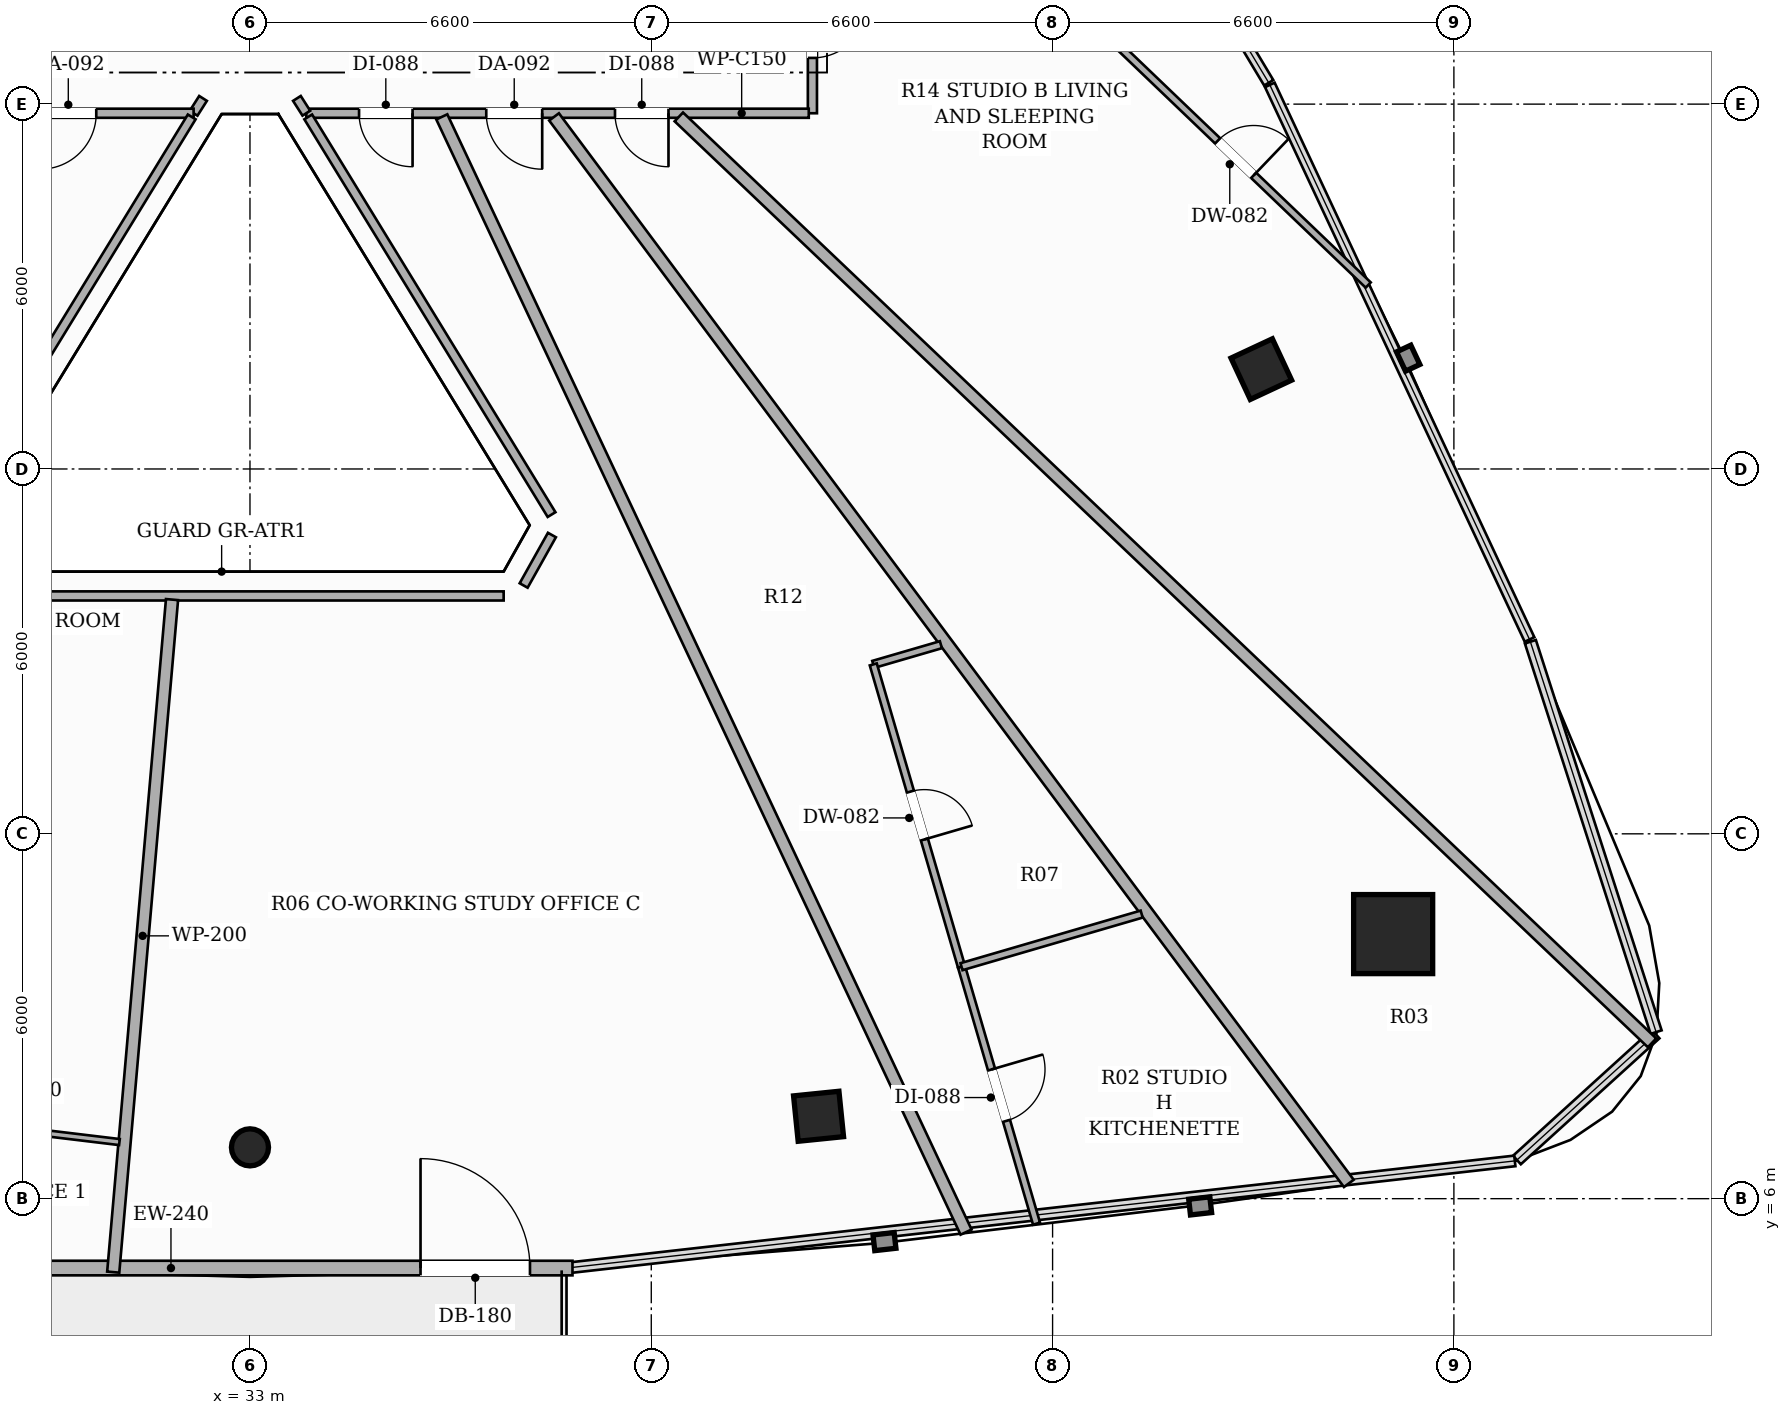
"""IFC4 building model, lengths in metres.
Left out: names, types, materials, properties, quantities, classifications, styles, units other than length and angle.
Written with IfcOpenShell. Run it as: python <this file> out.ifc"""

import sys

from ifc_helpers import new_model, si_unit, direction, frame, frame_2d, origin, origin_2d, place, context, subcontext, project, spatial, rectangle, hollow_rectangle, hollow_circle, extrude, element, fill, save


model = new_model("IFC4")
c1 = context("Model", 3, precision=1e-05, world=origin(), true_north=direction((0.0, 1.0)))
c2 = subcontext(c1, "Body", "Model", "MODEL_VIEW")
j1 = project(units=[si_unit("LENGTHUNIT", "METRE"), si_unit("PLANEANGLEUNIT", "RADIAN")], contexts=[c1])
p1 = place(None, origin())
s1 = spatial("IfcSite", under=j1, at=p1, CompositionType="ELEMENT")
p2 = place(p1, origin())
s2 = spatial("IfcBuilding", under=s1, at=p2, CompositionType="ELEMENT")
p3 = place(p2, frame((0.0, 0.0, 216.2)))
s3 = spatial("IfcBuildingStorey", under=s2, at=p3, CompositionType="ELEMENT", Elevation=216.2)
p4 = place(p3, frame((51.801, 10.351, 0.0), z_axis=(0.0, 0.0, 1.0), x_axis=(1.0, 0.0, 0.0)))
e1 = element("IfcColumn", 1, at=p4, inside=s3, PredefinedType="COLUMN", context=c2, shape_type="SweptSolid", body=[
    extrude(hollow_rectangle(XDim=1.3, YDim=1.3, WallThickness=0.04, at=origin_2d()), origin(), (0.0, 0.0, 1.0), 3.3),
])
p5 = place(p3, frame((33.0, 6.844, 0.0), z_axis=(0.0, 0.0, 1.0), x_axis=(1.0, 0.0, 0.0)))
e2 = element("IfcColumn", 2, at=p5, inside=s3, PredefinedType="COLUMN", context=c2, shape_type="SweptSolid", body=[
    extrude(hollow_circle(Radius=0.305, WallThickness=0.016, at=origin_2d()), origin(), (0.0, 0.0, 1.0), 3.3),
])
for number, where, z_axis, x_axis in (
    (3, (42.351, 7.355, 0.0), (0.0, 0.0, 1.0), (0.995, 0.101, 0.0)),
    (4, (49.633, 19.642, 0.0), (0.0, 0.0, 1.0), (-0.423, 0.906, 0.0)),
):
    element("IfcColumn", number, at=place(p3, frame(where, z_axis=z_axis, x_axis=x_axis)), inside=s3, PredefinedType="COLUMN", context=c2, shape_type="SweptSolid", body=[
        extrude(hollow_rectangle(XDim=0.75, YDim=0.75, WallThickness=0.025, at=origin_2d()), origin(), (0.0, 0.0, 1.0), 3.3),
    ])
p6 = place(p3, frame((27.696, 4.859, 0.0), z_axis=(0.0, 0.0, 1.0), x_axis=(1.0, 0.0, 0.0)))
e5 = element("IfcWall", 5, at=p6, inside=s3, PredefinedType="SOLIDWALL", context=c2, shape_type="SweptSolid", body=[
    extrude(rectangle(XDim=10.608, YDim=0.24, at=frame_2d((5.304, 0.0))), origin(), (0.0, 0.0, 1.0), 2.624),
])
p7 = place(p6, frame((8.109, 0.0, 0.0)))
e6 = element("IfcOpeningElement", 6, at=p7, cuts=e5, PredefinedType="OPENING", context=c2, shape_type="SweptSolid", body=[
    extrude(rectangle(XDim=1.8, YDim=2.2, at=frame_2d((0.9, 1.1))), frame((0.0, 0.13, 0.0), z_axis=(0.0, -1.0, 0.0), x_axis=(1.0, 0.0, 0.0)), (0.0, 0.0, 1.0), 0.26),
])
p8 = place(p3, frame((32.228, 24.094, 0.0), z_axis=(0.0, 0.0, 1.0), x_axis=(-0.53643811989, -0.843939656331, 0.0)))
e7 = element("IfcWall", 7, at=p8, inside=s3, PredefinedType="PARTITIONING", context=c2, shape_type="SweptSolid", body=[
    extrude(rectangle(XDim=0.289, YDim=0.15, at=frame_2d((0.145, 0.0))), origin(), (0.0, 0.0, 1.0), 3.06),
])
p9 = place(p3, frame((32.073, 23.85, 0.0), z_axis=(0.0, 0.0, 1.0), x_axis=(-1.0, 0.0, 0.0)))
e8 = element("IfcWall", 8, at=p9, inside=s3, PredefinedType="PARTITIONING", context=c2, shape_type="SweptSolid", body=[
    extrude(rectangle(XDim=8.423, YDim=0.15, at=frame_2d((4.211, 0.0))), origin(), (0.0, 0.0, 1.0), 2.565),
])
p10 = place(p9, frame((1.601, 0.0, 0.0)))
e9 = element("IfcOpeningElement", 9, at=p10, cuts=e8, PredefinedType="OPENING", context=c2, shape_type="SweptSolid", body=[
    extrude(rectangle(XDim=0.92, YDim=2.15, at=frame_2d((0.46, 1.075))), frame((0.0, 0.085, 0.0), z_axis=(0.0, -1.0, 0.0), x_axis=(1.0, 0.0, 0.0)), (0.0, 0.0, 1.0), 0.17),
])
p11 = place(p9, frame((4.841, 0.0, 0.0)))
e10 = element("IfcOpeningElement", 10, at=p11, cuts=e8, PredefinedType="OPENING", context=c2, shape_type="SweptSolid", body=[
    extrude(rectangle(XDim=0.88, YDim=2.1, at=frame_2d((0.44, 1.05))), frame((0.0, 0.085, 0.0), z_axis=(0.0, -1.0, 0.0), x_axis=(1.0, 0.0, 0.0)), (0.0, 0.0, 1.0), 0.17),
])
p12 = place(p3, frame((42.25, 26.59, 0.0), z_axis=(0.0, 0.0, 1.0), x_axis=(0.0, -1.0, 0.0)))
e11 = element("IfcWall", 11, at=p12, inside=s3, PredefinedType="PARTITIONING", context=c2, shape_type="SweptSolid", body=[
    extrude(rectangle(XDim=2.74, YDim=0.15, at=frame_2d((1.37, 0.0))), origin(), (0.0, 0.0, 1.0), 2.773),
])
p13 = place(p12, frame((0.91, 0.0, 0.0)))
e12 = element("IfcOpeningElement", 12, at=p13, cuts=e11, PredefinedType="OPENING", context=c2, shape_type="SweptSolid", body=[
    extrude(rectangle(XDim=0.92, YDim=2.15, at=frame_2d((0.46, 1.075))), frame((0.0, 0.085, 0.0), z_axis=(0.0, -1.0, 0.0), x_axis=(1.0, 0.0, 0.0)), (0.0, 0.0, 1.0), 0.17),
])
p14 = place(p3, frame((42.19, 23.85, 0.0), z_axis=(0.0, 0.0, 1.0), x_axis=(-1.0, 0.0, 0.0)))
e13 = element("IfcWall", 13, at=p14, inside=s3, PredefinedType="PARTITIONING", context=c2, shape_type="SweptSolid", body=[
    extrude(rectangle(XDim=8.263, YDim=0.15, at=frame_2d((4.131, 0.0))), origin(), (0.0, 0.0, 1.0), 2.565),
])
p15 = place(p14, frame((6.516, 0.0, 0.0)))
e14 = element("IfcOpeningElement", 14, at=p15, cuts=e13, PredefinedType="OPENING", context=c2, shape_type="SweptSolid", body=[
    extrude(rectangle(XDim=0.88, YDim=2.1, at=frame_2d((0.44, 1.05))), frame((0.0, 0.085, 0.0), z_axis=(0.0, -1.0, 0.0), x_axis=(1.0, 0.0, 0.0)), (0.0, 0.0, 1.0), 0.17),
])
p16 = place(p14, frame((2.307, 0.0, 0.0)))
e15 = element("IfcOpeningElement", 15, at=p16, cuts=e13, PredefinedType="OPENING", context=c2, shape_type="SweptSolid", body=[
    extrude(rectangle(XDim=0.88, YDim=2.1, at=frame_2d((0.44, 1.05))), frame((0.0, 0.085, 0.0), z_axis=(0.0, -1.0, 0.0), x_axis=(1.0, 0.0, 0.0)), (0.0, 0.0, 1.0), 0.17),
])
p17 = place(p14, frame((4.384, 0.0, 0.0)))
e16 = element("IfcOpeningElement", 16, at=p17, cuts=e13, PredefinedType="OPENING", context=c2, shape_type="SweptSolid", body=[
    extrude(rectangle(XDim=0.92, YDim=2.15, at=frame_2d((0.46, 1.075))), frame((0.0, 0.085, 0.0), z_axis=(0.0, -1.0, 0.0), x_axis=(1.0, 0.0, 0.0)), (0.0, 0.0, 1.0), 0.17),
])
p18 = place(p3, frame((33.927, 23.851, 0.0), z_axis=(0.0, 0.0, 1.0), x_axis=(-0.537971414128, 0.84296308198, 0.0)))
e17 = element("IfcWall", 17, at=p18, inside=s3, PredefinedType="PARTITIONING", context=c2, shape_type="SweptSolid", body=[
    extrude(rectangle(XDim=0.288, YDim=0.15, at=frame_2d((0.144, 0.0))), origin(), (0.0, 0.0, 1.0), 3.06),
])
p19 = place(p3, frame((33.958, 23.79, 0.0), z_axis=(0.0, 0.0, 1.0), x_axis=(0.521949656317, -0.852976292912, 0.0)))
e18 = element("IfcWall", 18, at=p19, inside=s3, PredefinedType="PARTITIONING", context=c2, shape_type="SweptSolid", body=[
    extrude(rectangle(XDim=7.667, YDim=0.15, at=frame_2d((3.833, 0.0))), origin(), (0.0, 0.0, 1.0), 2.773),
])
p20 = place(p3, frame((37.966, 16.914, 0.0), z_axis=(0.0, 0.0, 1.0), x_axis=(-0.48879868802, -0.872396608539, 0.0)))
e19 = element("IfcWall", 19, at=p20, inside=s3, PredefinedType="PARTITIONING", context=c2, shape_type="SweptSolid", body=[
    extrude(rectangle(XDim=0.951, YDim=0.15, at=frame_2d((0.476, 0.0))), origin(), (0.0, 0.0, 1.0), 3.06),
])
p21 = place(p3, frame((37.172, 15.912, 0.0), z_axis=(0.0, 0.0, 1.0), x_axis=(-1.0, 0.0, 0.0)))
e20 = element("IfcWall", 20, at=p21, inside=s3, PredefinedType="PARTITIONING", context=c2, shape_type="SweptSolid", body=[
    extrude(rectangle(XDim=8.344, YDim=0.15, at=frame_2d((4.172, 0.0))), origin(), (0.0, 0.0, 1.0), 2.773),
])
p22 = place(p3, frame((28.04, 17.25, 0.0), z_axis=(0.0, 0.0, 1.0), x_axis=(0.521949656317, 0.852976292912, 0.0)))
e21 = element("IfcWall", 21, at=p22, inside=s3, PredefinedType="PARTITIONING", context=c2, shape_type="SweptSolid", body=[
    extrude(rectangle(XDim=7.667, YDim=0.15, at=frame_2d((3.833, 0.0))), origin(), (0.0, 0.0, 1.0), 2.773),
])
p23 = place(p3, frame((31.718, 15.852, 0.0), z_axis=(0.0, 0.0, 1.0), x_axis=(-0.087103117533, -0.996199300801, 0.0)))
e22 = element("IfcWall", 22, at=p23, inside=s3, PredefinedType="PARTITIONING", context=c2, shape_type="SweptSolid", body=[
    extrude(rectangle(XDim=11.102, YDim=0.2, at=frame_2d((5.551, 0.0))), origin(), (0.0, 0.0, 1.0), 2.492),
])
p24 = place(p3, frame((56.059, 8.563, 0.0), z_axis=(0.0, 0.0, 1.0), x_axis=(-0.724518891706, 0.689254942355, 0.0)))
e23 = element("IfcWall", 23, at=p24, inside=s3, PredefinedType="PARTITIONING", context=c2, shape_type="SweptSolid", body=[
    extrude(rectangle(XDim=22.092, YDim=0.2, at=frame_2d((11.046, 0.0))), origin(), (0.0, 0.0, 1.0), 2.492),
])
p25 = place(p3, frame((36.155, 23.79, 0.0), z_axis=(0.0, 0.0, 1.0), x_axis=(0.425451226132, -0.90498135571, 0.0)))
e24 = element("IfcWall", 24, at=p25, inside=s3, PredefinedType="PARTITIONING", context=c2, shape_type="SweptSolid", body=[
    extrude(rectangle(XDim=20.266, YDim=0.2, at=frame_2d((10.133, 0.0))), origin(), (0.0, 0.0, 1.0), 2.492),
])
p26 = place(p3, frame((51.072, 6.251, 0.0), z_axis=(0.0, 0.0, 1.0), x_axis=(-0.59756139073, 0.801823162742, 0.0)))
e25 = element("IfcWall", 25, at=p26, inside=s3, PredefinedType="PARTITIONING", context=c2, shape_type="SweptSolid", body=[
    extrude(rectangle(XDim=21.874, YDim=0.2, at=frame_2d((10.937, 0.0))), origin(), (0.0, 0.0, 1.0), 2.492),
])
p27 = place(p3, frame((30.853, 6.931, 0.0), z_axis=(0.0, 0.0, 1.0), x_axis=(-0.992840033501, 0.119451529409, 0.0)))
e26 = element("IfcWall", 26, at=p27, inside=s3, PredefinedType="PARTITIONING", context=c2, shape_type="SweptSolid", body=[
    extrude(rectangle(XDim=7.417, YDim=0.1, at=frame_2d((3.708, 0.0))), origin(), (0.0, 0.0, 1.0), 2.492),
])
p28 = place(p27, frame((3.269, 0.0, 0.0)))
e27 = element("IfcOpeningElement", 27, at=p28, cuts=e26, PredefinedType="OPENING", context=c2, shape_type="SweptSolid", body=[
    extrude(rectangle(XDim=0.88, YDim=2.1, at=frame_2d((0.44, 1.05))), frame((0.0, 0.06, 0.0), z_axis=(0.0, -1.0, 0.0), x_axis=(1.0, 0.0, 0.0)), (0.0, 0.0, 1.0), 0.12),
])
p29 = place(p3, frame((47.03, 25.2, 0.0), z_axis=(0.0, 0.0, 1.0), x_axis=(0.722345830301, -0.691531995968, 0.0)))
e28 = element("IfcWall", 28, at=p29, inside=s3, PredefinedType="PARTITIONING", context=c2, shape_type="SweptSolid", body=[
    extrude(rectangle(XDim=6.037, YDim=0.12, at=frame_2d((3.019, 0.0))), origin(), (0.0, 0.0, 1.0), 2.492),
])
p30 = place(p29, frame((2.609, 0.0, 0.0)))
e29 = element("IfcOpeningElement", 29, at=p30, cuts=e28, PredefinedType="OPENING", context=c2, shape_type="SweptSolid", body=[
    extrude(rectangle(XDim=0.82, YDim=2.1, at=frame_2d((0.41, 1.05))), frame((0.0, 0.07, 0.0), z_axis=(0.0, -1.0, 0.0), x_axis=(1.0, 0.0, 0.0)), (0.0, 0.0, 1.0), 0.14),
])
p31 = place(p3, frame((44.363, 15.11, 0.0), z_axis=(0.0, 0.0, 1.0), x_axis=(-0.960030681494, -0.279894784857, 0.0)))
e30 = element("IfcWall", 30, at=p31, inside=s3, PredefinedType="PARTITIONING", context=c2, shape_type="SweptSolid", body=[
    extrude(rectangle(XDim=1.158, YDim=0.12, at=frame_2d((0.579, 0.0))), origin(), (0.0, 0.0, 1.0), 2.773),
])
p32 = place(p3, frame((43.251, 14.786, 0.0), z_axis=(0.0, 0.0, 1.0), x_axis=(0.280190088139, -0.959944537204, 0.0)))
e31 = element("IfcWall", 31, at=p32, inside=s3, PredefinedType="PARTITIONING", context=c2, shape_type="SweptSolid", body=[
    extrude(rectangle(XDim=5.178, YDim=0.12, at=frame_2d((2.589, 0.0))), origin(), (0.0, 0.0, 1.0), 3.06),
])
p33 = place(p32, frame((2.179, 0.0, 0.0)))
e32 = element("IfcOpeningElement", 32, at=p33, cuts=e31, PredefinedType="OPENING", context=c2, shape_type="SweptSolid", body=[
    extrude(rectangle(XDim=0.82, YDim=2.1, at=frame_2d((0.41, 1.05))), frame((0.0, 0.07, 0.0), z_axis=(0.0, -1.0, 0.0), x_axis=(1.0, 0.0, 0.0)), (0.0, 0.0, 1.0), 0.14),
])
p34 = place(p3, frame((44.702, 9.815, 0.0), z_axis=(0.0, 0.0, 1.0), x_axis=(0.28033432121, -0.959902426474, 0.0)))
e33 = element("IfcWall", 33, at=p34, inside=s3, PredefinedType="PARTITIONING", context=c2, shape_type="SweptSolid", body=[
    extrude(rectangle(XDim=4.402, YDim=0.12, at=frame_2d((2.201, 0.0))), origin(), (0.0, 0.0, 1.0), 2.492),
])
p35 = place(p34, frame((1.761, 0.0, 0.0)))
e34 = element("IfcOpeningElement", 34, at=p35, cuts=e33, PredefinedType="OPENING", context=c2, shape_type="SweptSolid", body=[
    extrude(rectangle(XDim=0.88, YDim=2.1, at=frame_2d((0.44, 1.05))), frame((0.0, 0.07, 0.0), z_axis=(0.0, -1.0, 0.0), x_axis=(1.0, 0.0, 0.0)), (0.0, 0.0, 1.0), 0.14),
])
p36 = place(p3, frame((47.665, 10.68, 0.0), z_axis=(0.0, 0.0, 1.0), x_axis=(-0.959935309068, -0.280221702235, 0.0)))
e35 = element("IfcWall", 35, at=p36, inside=s3, PredefinedType="PARTITIONING", context=c2, shape_type="SweptSolid", body=[
    extrude(rectangle(XDim=3.087, YDim=0.12, at=frame_2d((1.543, 0.0))), origin(), (0.0, 0.0, 1.0), 2.773),
])
p37 = place(p7, origin())
e36 = element("IfcDoor", 36, at=p37, inside=s3, OperationType="SINGLE_SWING_LEFT", PredefinedType="DOOR", context=c2, shape_type="SweptSolid", body=[
    extrude(rectangle(XDim=1.8, YDim=2.2, at=frame_2d((0.9, 1.1))), frame((0.0, 0.025, 0.0), z_axis=(0.0, -1.0, 0.0), x_axis=(1.0, 0.0, 0.0)), (0.0, 0.0, 1.0), 0.05),
])
fill(e6, e36)
p38 = place(p10, origin())
e37 = element("IfcDoor", 37, at=p38, inside=s3, OperationType="SINGLE_SWING_RIGHT", PredefinedType="DOOR", context=c2, shape_type="SweptSolid", body=[
    extrude(rectangle(XDim=0.92, YDim=2.15, at=frame_2d((0.46, 1.075))), frame((0.0, 0.025, 0.0), z_axis=(0.0, -1.0, 0.0), x_axis=(1.0, 0.0, 0.0)), (0.0, 0.0, 1.0), 0.05),
])
fill(e9, e37)
p39 = place(p13, origin())
e38 = element("IfcDoor", 38, at=p39, inside=s3, OperationType="SINGLE_SWING_LEFT", PredefinedType="DOOR", context=c2, shape_type="SweptSolid", body=[
    extrude(rectangle(XDim=0.92, YDim=2.15, at=frame_2d((0.46, 1.075))), frame((0.0, 0.025, 0.0), z_axis=(0.0, -1.0, 0.0), x_axis=(1.0, 0.0, 0.0)), (0.0, 0.0, 1.0), 0.05),
])
fill(e12, e38)
p40 = place(p30, origin())
e39 = element("IfcDoor", 39, at=p40, inside=s3, OperationType="SINGLE_SWING_RIGHT", PredefinedType="DOOR", context=c2, shape_type="SweptSolid", body=[
    extrude(rectangle(XDim=0.82, YDim=2.1, at=frame_2d((0.41, 1.05))), frame((0.0, 0.025, 0.0), z_axis=(0.0, -1.0, 0.0), x_axis=(1.0, 0.0, 0.0)), (0.0, 0.0, 1.0), 0.05),
])
fill(e29, e39)
p41 = place(p15, origin())
e40 = element("IfcDoor", 40, at=p41, inside=s3, OperationType="SINGLE_SWING_LEFT", PredefinedType="DOOR", context=c2, shape_type="SweptSolid", body=[
    extrude(rectangle(XDim=0.88, YDim=2.1, at=frame_2d((0.44, 1.05))), frame((0.0, 0.025, 0.0), z_axis=(0.0, -1.0, 0.0), x_axis=(1.0, 0.0, 0.0)), (0.0, 0.0, 1.0), 0.05),
])
fill(e14, e40)
p42 = place(p16, origin())
e41 = element("IfcDoor", 41, at=p42, inside=s3, OperationType="SINGLE_SWING_LEFT", PredefinedType="DOOR", context=c2, shape_type="SweptSolid", body=[
    extrude(rectangle(XDim=0.88, YDim=2.1, at=frame_2d((0.44, 1.05))), frame((0.0, 0.025, 0.0), z_axis=(0.0, -1.0, 0.0), x_axis=(1.0, 0.0, 0.0)), (0.0, 0.0, 1.0), 0.05),
])
fill(e15, e41)
p43 = place(p17, origin())
e42 = element("IfcDoor", 42, at=p43, inside=s3, OperationType="SINGLE_SWING_LEFT", PredefinedType="DOOR", context=c2, shape_type="SweptSolid", body=[
    extrude(rectangle(XDim=0.92, YDim=2.15, at=frame_2d((0.46, 1.075))), frame((0.0, 0.025, 0.0), z_axis=(0.0, -1.0, 0.0), x_axis=(1.0, 0.0, 0.0)), (0.0, 0.0, 1.0), 0.05),
])
fill(e16, e42)
p44 = place(p33, origin())
e43 = element("IfcDoor", 43, at=p44, inside=s3, OperationType="SINGLE_SWING_RIGHT", PredefinedType="DOOR", context=c2, shape_type="SweptSolid", body=[
    extrude(rectangle(XDim=0.82, YDim=2.1, at=frame_2d((0.41, 1.05))), frame((0.0, 0.025, 0.0), z_axis=(0.0, -1.0, 0.0), x_axis=(1.0, 0.0, 0.0)), (0.0, 0.0, 1.0), 0.05),
])
fill(e32, e43)
p45 = place(p35, origin())
e44 = element("IfcDoor", 44, at=p45, inside=s3, OperationType="SINGLE_SWING_LEFT", PredefinedType="DOOR", context=c2, shape_type="SweptSolid", body=[
    extrude(rectangle(XDim=0.88, YDim=2.1, at=frame_2d((0.44, 1.05))), frame((0.0, 0.025, 0.0), z_axis=(0.0, -1.0, 0.0), x_axis=(1.0, 0.0, 0.0)), (0.0, 0.0, 1.0), 0.05),
])
fill(e34, e44)
save(model, sys.argv[1])
